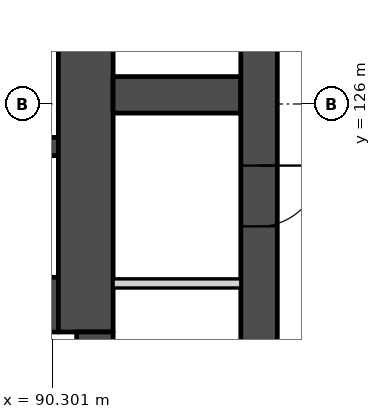
"""IFC4 building model, lengths in metres.
Left out: names, types, materials, properties, quantities, classifications, styles, units other than length and angle.
Written with IfcOpenShell. Run it as: python <this file> out.ifc"""

import sys

from ifc_helpers import new_model, si_unit, direction, frame, frame_2d, origin, place, context, subcontext, project, spatial, polyline, rectangle, outline, extrude, element, fill, save


model = new_model("IFC4")
c1 = context("Model", 3, precision=1e-05, world=origin(), true_north=direction((0.0, 1.0)))
c2 = subcontext(c1, "Body", "Model", "MODEL_VIEW")
j1 = project(units=[si_unit("LENGTHUNIT", "METRE"), si_unit("PLANEANGLEUNIT", "RADIAN")], contexts=[c1])
p1 = place(None, origin())
s1 = spatial("IfcSite", under=j1, at=p1, CompositionType="ELEMENT")
p2 = place(p1, origin())
s2 = spatial("IfcBuilding", under=s1, at=p2, CompositionType="ELEMENT")
p3 = place(p2, frame((0.0, 0.0, 120.3)))
s3 = spatial("IfcBuildingStorey", under=s2, at=p3, CompositionType="ELEMENT", Elevation=120.3)
p4 = place(p3, frame((87.85, 125.3, 0.0), z_axis=(0.0, 0.0, 1.0), x_axis=(1.0, 0.0, 0.0)))
e1 = element("IfcWall", 1, at=p4, inside=s3, PredefinedType="SOLIDWALL", context=c2, shape_type="SweptSolid", body=[
    extrude(rectangle(XDim=2.55, YDim=0.3, at=frame_2d((1.275, 0.0))), origin(), (0.0, 0.0, 1.0), 3.25),
])
p5 = place(p3, frame((87.85, 122.7, 0.0), z_axis=(0.0, 0.0, 1.0), x_axis=(1.0, 0.0, 0.0)))
e2 = element("IfcWall", 2, at=p5, inside=s3, PredefinedType="SOLIDWALL", context=c2, shape_type="SweptSolid", body=[
    extrude(rectangle(XDim=2.55, YDim=0.9, at=frame_2d((1.275, 0.0))), origin(), (0.0, 0.0, 1.0), 3.25),
])
p6 = place(p3, frame((90.85, 133.95, 0.0), z_axis=(0.0, 0.0, 1.0), x_axis=(0.0, -1.0, 0.0)))
e3 = element("IfcWall", 3, at=p6, inside=s3, PredefinedType="SOLIDWALL", context=c2, shape_type="SweptSolid", body=[
    extrude(rectangle(XDim=11.7, YDim=0.9, at=frame_2d((5.85, 0.0))), origin(), (0.0, 0.0, 1.0), 3.25),
])
p7 = place(p3, frame((91.0, 122.25, 0.0), z_axis=(0.0, 0.0, 1.0), x_axis=(0.0, -1.0, 0.0)))
e4 = element("IfcWall", 4, at=p7, inside=s3, PredefinedType="SOLIDWALL", context=c2, shape_type="SweptSolid", body=[
    extrude(rectangle(XDim=2.1, YDim=0.6, at=frame_2d((1.05, 0.0))), origin(), (0.0, 0.0, 1.0), 3.25),
])
p8 = place(p3, frame((91.3, 126.15, 0.0), z_axis=(0.0, 0.0, 1.0), x_axis=(1.0, 0.0, 0.0)))
e5 = element("IfcWall", 5, at=p8, inside=s3, PredefinedType="SOLIDWALL", context=c2, shape_type="SweptSolid", body=[
    extrude(rectangle(XDim=2.1, YDim=0.6, at=frame_2d((1.05, 0.0))), origin(), (0.0, 0.0, 1.0), 3.25),
])
p9 = place(p3, frame((91.3, 123.049, 0.0), z_axis=(0.0, 0.0, 1.0), x_axis=(1.0, 0.0, 0.0)))
e6 = element("IfcWall", 6, at=p9, inside=s3, PredefinedType="PARTITIONING", context=c2, shape_type="SweptSolid", body=[
    extrude(rectangle(XDim=2.1, YDim=0.15, at=frame_2d((1.05, 0.0))), origin(), (0.0, 0.0, 1.0), 3.25),
])
p10 = place(p3, frame((93.7, 133.95, 0.0), z_axis=(0.0, 0.0, 1.0), x_axis=(0.0, -1.0, 0.0)))
e7 = element("IfcWall", 7, at=p10, inside=s3, PredefinedType="SOLIDWALL", context=c2, shape_type="SweptSolid", body=[
    extrude(rectangle(XDim=13.8, YDim=0.6, at=frame_2d((6.9, 0.0))), origin(), (0.0, 0.0, 1.0), 3.25),
])
p11 = place(p10, frame((0.6, 0.0, 0.0)))
e8 = element("IfcOpeningElement", 8, at=p11, cuts=e7, PredefinedType="OPENING", context=c2, shape_type="SweptSolid", body=[
    extrude(rectangle(XDim=1.1, YDim=2.1, at=frame_2d((0.55, 1.05))), frame((0.0, 0.31, 0.0), z_axis=(0.0, -1.0, 0.0), x_axis=(1.0, 0.0, 0.0)), (0.0, 0.0, 1.0), 0.62),
])
p12 = place(p10, frame((8.963, 0.0, 0.0)))
e9 = element("IfcOpeningElement", 9, at=p12, cuts=e7, PredefinedType="OPENING", context=c2, shape_type="SweptSolid", body=[
    extrude(rectangle(XDim=1.0, YDim=2.1, at=frame_2d((0.5, 1.05))), frame((0.0, 0.31, 0.0), z_axis=(0.0, -1.0, 0.0), x_axis=(1.0, 0.0, 0.0)), (0.0, 0.0, 1.0), 0.62),
])
p13 = place(p10, frame((11.888, 0.0, 0.0)))
e10 = element("IfcOpeningElement", 10, at=p13, cuts=e7, PredefinedType="OPENING", context=c2, shape_type="SweptSolid", body=[
    extrude(rectangle(XDim=1.0, YDim=2.1, at=frame_2d((0.5, 1.05))), frame((0.0, 0.31, 0.0), z_axis=(0.0, -1.0, 0.0), x_axis=(1.0, 0.0, 0.0)), (0.0, 0.0, 1.0), 0.62),
])
p14 = place(p3, frame((82.605, 93.333, -0.15), z_axis=(0.0, 0.0, 1.0), x_axis=(0.500000478905, 0.866025127289, 0.0)))
e11 = element("IfcWall", 11, at=p14, inside=s3, PredefinedType="SOLIDWALL", context=c2, shape_type="SweptSolid", body=[
    extrude(outline(polyline([(42.643, 0.0), (42.643, 3.4), (0.0, 3.4), (0.0, 0.0), (42.643, 0.0)])), frame((0.0, 0.225, 0.0), z_axis=(0.0, -1.0, 0.0), x_axis=(1.0, 0.0, 0.0)), (0.0, 0.0, 1.0), 0.45),
])
p15 = place(p14, frame((2.814, 0.0, 1.05)))
e12 = element("IfcOpeningElement", 12, at=p15, cuts=e11, PredefinedType="OPENING", context=c2, shape_type="SweptSolid", body=[
    extrude(rectangle(XDim=1.2, YDim=1.5, at=frame_2d((0.6, 0.75))), frame((0.0, 0.235, 0.0), z_axis=(0.0, -1.0, 0.0), x_axis=(1.0, 0.0, 0.0)), (0.0, 0.0, 1.0), 0.47),
])
p16 = place(p14, frame((4.514, 0.0, 1.05)))
e13 = element("IfcOpeningElement", 13, at=p16, cuts=e11, PredefinedType="OPENING", context=c2, shape_type="SweptSolid", body=[
    extrude(rectangle(XDim=1.2, YDim=1.5, at=frame_2d((0.6, 0.75))), frame((0.0, 0.235, 0.0), z_axis=(0.0, -1.0, 0.0), x_axis=(1.0, 0.0, 0.0)), (0.0, 0.0, 1.0), 0.47),
])
p17 = place(p14, frame((11.343, 0.0, 1.05)))
e14 = element("IfcOpeningElement", 14, at=p17, cuts=e11, PredefinedType="OPENING", context=c2, shape_type="SweptSolid", body=[
    extrude(rectangle(XDim=1.2, YDim=1.5, at=frame_2d((0.6, 0.75))), frame((0.0, 0.235, 0.0), z_axis=(0.0, -1.0, 0.0), x_axis=(1.0, 0.0, 0.0)), (0.0, 0.0, 1.0), 0.47),
])
p18 = place(p14, frame((13.043, 0.0, 1.05)))
e15 = element("IfcOpeningElement", 15, at=p18, cuts=e11, PredefinedType="OPENING", context=c2, shape_type="SweptSolid", body=[
    extrude(rectangle(XDim=1.2, YDim=1.5, at=frame_2d((0.6, 0.75))), frame((0.0, 0.235, 0.0), z_axis=(0.0, -1.0, 0.0), x_axis=(1.0, 0.0, 0.0)), (0.0, 0.0, 1.0), 0.47),
])
p19 = place(p14, frame((19.872, 0.0, 1.05)))
e16 = element("IfcOpeningElement", 16, at=p19, cuts=e11, PredefinedType="OPENING", context=c2, shape_type="SweptSolid", body=[
    extrude(rectangle(XDim=1.2, YDim=1.5, at=frame_2d((0.6, 0.75))), frame((0.0, 0.235, 0.0), z_axis=(0.0, -1.0, 0.0), x_axis=(1.0, 0.0, 0.0)), (0.0, 0.0, 1.0), 0.47),
])
p20 = place(p14, frame((21.572, 0.0, 1.05)))
e17 = element("IfcOpeningElement", 17, at=p20, cuts=e11, PredefinedType="OPENING", context=c2, shape_type="SweptSolid", body=[
    extrude(rectangle(XDim=1.2, YDim=1.5, at=frame_2d((0.6, 0.75))), frame((0.0, 0.235, 0.0), z_axis=(0.0, -1.0, 0.0), x_axis=(1.0, 0.0, 0.0)), (0.0, 0.0, 1.0), 0.47),
])
p21 = place(p14, frame((28.4, 0.0, 1.05)))
e18 = element("IfcOpeningElement", 18, at=p21, cuts=e11, PredefinedType="OPENING", context=c2, shape_type="SweptSolid", body=[
    extrude(rectangle(XDim=1.2, YDim=1.5, at=frame_2d((0.6, 0.75))), frame((0.0, 0.235, 0.0), z_axis=(0.0, -1.0, 0.0), x_axis=(1.0, 0.0, 0.0)), (0.0, 0.0, 1.0), 0.47),
])
p22 = place(p14, frame((30.1, 0.0, 1.05)))
e19 = element("IfcOpeningElement", 19, at=p22, cuts=e11, PredefinedType="OPENING", context=c2, shape_type="SweptSolid", body=[
    extrude(rectangle(XDim=1.2, YDim=1.5, at=frame_2d((0.6, 0.75))), frame((0.0, 0.235, 0.0), z_axis=(0.0, -1.0, 0.0), x_axis=(1.0, 0.0, 0.0)), (0.0, 0.0, 1.0), 0.47),
])
p23 = place(p14, frame((36.929, 0.0, 1.05)))
e20 = element("IfcOpeningElement", 20, at=p23, cuts=e11, PredefinedType="OPENING", context=c2, shape_type="SweptSolid", body=[
    extrude(rectangle(XDim=1.2, YDim=1.5, at=frame_2d((0.6, 0.75))), frame((0.0, 0.235, 0.0), z_axis=(0.0, -1.0, 0.0), x_axis=(1.0, 0.0, 0.0)), (0.0, 0.0, 1.0), 0.47),
])
p24 = place(p14, frame((38.629, 0.0, 1.05)))
e21 = element("IfcOpeningElement", 21, at=p24, cuts=e11, PredefinedType="OPENING", context=c2, shape_type="SweptSolid", body=[
    extrude(rectangle(XDim=1.2, YDim=1.5, at=frame_2d((0.6, 0.75))), frame((0.0, 0.235, 0.0), z_axis=(0.0, -1.0, 0.0), x_axis=(1.0, 0.0, 0.0)), (0.0, 0.0, 1.0), 0.47),
])
p25 = place(p12, origin())
e22 = element("IfcDoor", 22, at=p25, inside=s3, OperationType="SINGLE_SWING_LEFT", PredefinedType="DOOR", context=c2, shape_type="SweptSolid", body=[
    extrude(rectangle(XDim=1.0, YDim=2.1, at=frame_2d((0.5, 1.05))), frame((0.0, 0.025, 0.0), z_axis=(0.0, -1.0, 0.0), x_axis=(1.0, 0.0, 0.0)), (0.0, 0.0, 1.0), 0.05),
])
fill(e9, e22)
save(model, sys.argv[1])
